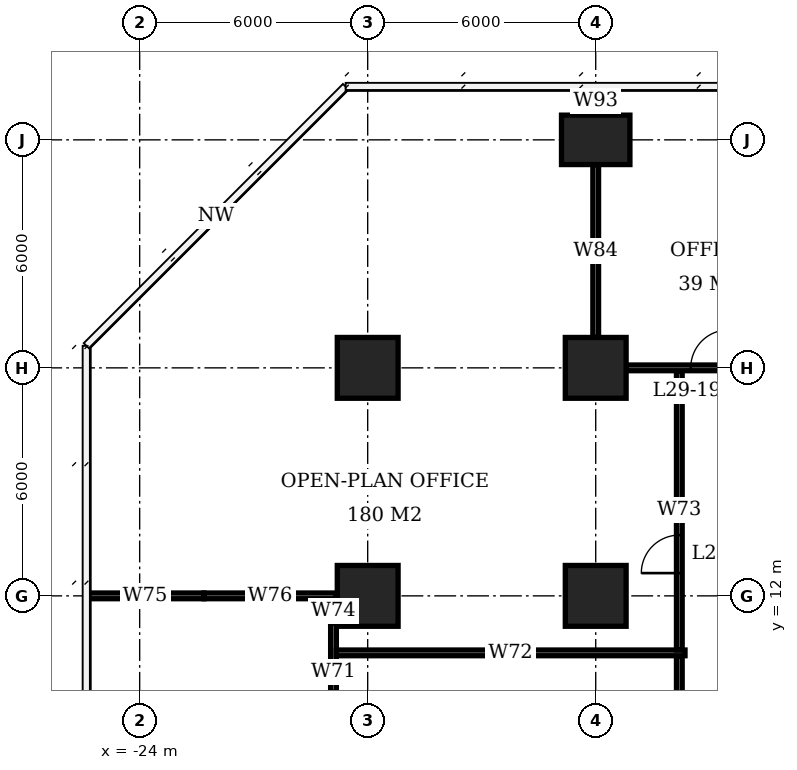
"""IFC4 building model, lengths in metres.
Left out: names, types, materials, properties, quantities, classifications, styles, units other than length and angle.
Written with IfcOpenShell. Run it as: python <this file> out.ifc"""

import sys

from ifc_helpers import new_model, si_unit, direction, frame, frame_2d, origin, origin_2d, place, context, subcontext, project, spatial, rectangle, extrude, element, fill, save


model = new_model("IFC4")
c1 = context("Model", 3, precision=1e-05, world=origin(), true_north=direction((0.0, 1.0)))
c2 = subcontext(c1, "Body", "Model", "MODEL_VIEW")
j1 = project(units=[si_unit("LENGTHUNIT", "METRE"), si_unit("PLANEANGLEUNIT", "RADIAN")], contexts=[c1])
p1 = place(None, origin())
s1 = spatial("IfcSite", under=j1, at=p1, CompositionType="ELEMENT")
p2 = place(p1, origin())
s2 = spatial("IfcBuilding", under=s1, at=p2, CompositionType="ELEMENT")
p3 = place(p2, frame((0.0, 0.0, 121.1)))
s3 = spatial("IfcBuildingStorey", under=s2, at=p3, CompositionType="ELEMENT", Elevation=121.1)
for number, where, z_axis, x_axis in (
    (1, (-18.0, 12.0, 0.0), (0.0, 0.0, 1.0), (1.0, 0.0, 0.0)),
    (2, (-18.0, 18.0, 0.0), (0.0, 0.0, 1.0), (1.0, 0.0, 0.0)),
    (3, (-12.0, 12.0, 0.0), (0.0, 0.0, 1.0), (1.0, 0.0, 0.0)),
    (4, (-12.0, 18.0, 0.0), (0.0, 0.0, 1.0), (1.0, 0.0, 0.0)),
):
    element("IfcColumn", number, at=place(p3, frame(where, z_axis=z_axis, x_axis=x_axis)), inside=s3, PredefinedType="COLUMN", context=c2, shape_type="SweptSolid", body=[
        extrude(rectangle(XDim=1.6, YDim=1.6, at=origin_2d()), origin(), (0.0, 0.0, 1.0), 3.9),
    ])
p4 = place(p3, frame((-12.0, 24.0, 0.0), z_axis=(0.0, 0.0, 1.0), x_axis=(1.0, 0.0, 0.0)))
e5 = element("IfcColumn", 5, at=p4, inside=s3, PredefinedType="COLUMN", context=c2, shape_type="SweptSolid", body=[
    extrude(rectangle(XDim=1.8, YDim=1.3, at=origin_2d()), origin(), (0.0, 0.0, 1.0), 3.9),
])
p5 = place(p3, frame((-25.4, 12.0, 0.0), z_axis=(0.0, 0.0, 1.0), x_axis=(1.0, 0.0, 0.0)))
e6 = element("IfcWall", 6, at=p5, inside=s3, PredefinedType="PARTITIONING", context=c2, shape_type="SweptSolid", body=[
    extrude(rectangle(XDim=3.09, YDim=0.15, at=frame_2d((1.545, 0.0))), origin(), (0.0, 0.0, 1.0), 3.65),
])
p6 = place(p3, frame((-22.31, 12.0, 0.0), z_axis=(0.0, 0.0, 1.0), x_axis=(1.0, 0.0, 0.0)))
e7 = element("IfcWall", 7, at=p6, inside=s3, PredefinedType="PARTITIONING", context=c2, shape_type="SweptSolid", body=[
    extrude(rectangle(XDim=3.485, YDim=0.15, at=frame_2d((1.743, 0.0))), origin(), (0.0, 0.0, 1.0), 2.65),
])
p7 = place(p3, frame((-11.2, 18.0, 0.0), z_axis=(0.0, 0.0, 1.0), x_axis=(1.0, 0.0, 0.0)))
e8 = element("IfcWall", 8, at=p7, inside=s3, PredefinedType="PARTITIONING", context=c2, shape_type="SweptSolid", body=[
    extrude(rectangle(XDim=4.4, YDim=0.15, at=frame_2d((2.2, 0.0))), origin(), (0.0, 0.0, 1.0), 3.65),
])
p8 = place(p7, frame((1.7, 0.0, 0.0)))
e9 = element("IfcOpeningElement", 9, at=p8, cuts=e8, PredefinedType="OPENING", context=c2, shape_type="SweptSolid", body=[
    extrude(rectangle(XDim=1.0, YDim=2.1, at=frame_2d((0.5, 1.05))), frame((0.0, 0.085, 0.0), z_axis=(0.0, -1.0, 0.0), x_axis=(1.0, 0.0, 0.0)), (0.0, 0.0, 1.0), 0.17),
])
p9 = place(p3, frame((-18.9, 6.71, 0.0), z_axis=(0.0, 0.0, 1.0), x_axis=(0.0, 1.0, 0.0)))
e10 = element("IfcWall", 10, at=p9, inside=s3, PredefinedType="PARTITIONING", context=c2, shape_type="SweptSolid", body=[
    extrude(rectangle(XDim=4.58, YDim=0.15, at=frame_2d((2.29, 0.0))), origin(), (0.0, 0.0, 1.0), 3.65),
])
p10 = place(p9, frame((1.79, 0.0, 0.0)))
e11 = element("IfcOpeningElement", 11, at=p10, cuts=e10, PredefinedType="OPENING", context=c2, shape_type="SweptSolid", body=[
    extrude(rectangle(XDim=1.0, YDim=2.1, at=frame_2d((0.5, 1.05))), frame((0.0, 0.085, 0.0), z_axis=(0.0, -1.0, 0.0), x_axis=(1.0, 0.0, 0.0)), (0.0, 0.0, 1.0), 0.17),
])
p11 = place(p3, frame((-18.9, 11.29, 0.0), z_axis=(0.0, 0.0, 1.0), x_axis=(0.0, 1.0, 0.0)))
e12 = element("IfcWall", 12, at=p11, inside=s3, PredefinedType="PARTITIONING", context=c2, shape_type="SweptSolid", body=[
    extrude(rectangle(XDim=0.635, YDim=0.15, at=frame_2d((0.317, 0.0))), origin(), (0.0, 0.0, 1.0), 2.65),
])
p12 = place(p3, frame((-12.0, 18.8, 0.0), z_axis=(0.0, 0.0, 1.0), x_axis=(0.0, 1.0, 0.0)))
e13 = element("IfcWall", 13, at=p12, inside=s3, PredefinedType="PARTITIONING", context=c2, shape_type="SweptSolid", body=[
    extrude(rectangle(XDim=4.55, YDim=0.15, at=frame_2d((2.275, 0.0))), origin(), (0.0, 0.0, 1.0), 3.65),
])
p13 = place(p3, frame((-12.0, 24.65, 0.0), z_axis=(0.0, 0.0, 1.0), x_axis=(0.0, 1.0, 0.0)))
e14 = element("IfcWall", 14, at=p13, inside=s3, PredefinedType="PARTITIONING", context=c2, shape_type="SweptSolid", body=[
    extrude(rectangle(XDim=0.75, YDim=0.15, at=frame_2d((0.375, 0.0))), origin(), (0.0, 0.0, 1.0), 3.65),
])
p14 = place(p3, frame((-18.825, 10.5, 0.0), z_axis=(0.0, 0.0, 1.0), x_axis=(1.0, 0.0, 0.0)))
e15 = element("IfcWall", 15, at=p14, inside=s3, PredefinedType="PARTITIONING", context=c2, shape_type="SweptSolid", body=[
    extrude(rectangle(XDim=9.175, YDim=0.15, at=frame_2d((4.587, 0.0))), origin(), (0.0, 0.0, 1.0), 3.65),
])
p15 = place(p3, frame((-9.8, -0.9, 0.0), z_axis=(0.0, 0.0, 1.0), x_axis=(0.0, 1.0, 0.0)))
e16 = element("IfcWall", 16, at=p15, inside=s3, PredefinedType="PARTITIONING", context=c2, shape_type="SweptSolid", body=[
    extrude(rectangle(XDim=11.325, YDim=0.15, at=frame_2d((5.663, 0.0))), origin(), (0.0, 0.0, 1.0), 3.65),
])
p16 = place(p15, frame((3.441, 0.0, 0.0)))
e17 = element("IfcOpeningElement", 17, at=p16, cuts=e16, PredefinedType="OPENING", context=c2, shape_type="SweptSolid", body=[
    extrude(rectangle(XDim=1.0, YDim=2.1, at=frame_2d((0.5, 1.05))), frame((0.0, 0.085, 0.0), z_axis=(0.0, -1.0, 0.0), x_axis=(1.0, 0.0, 0.0)), (0.0, 0.0, 1.0), 0.17),
])
p17 = place(p3, frame((-9.8, 10.575, 0.0), z_axis=(0.0, 0.0, 1.0), x_axis=(0.0, 1.0, 0.0)))
e18 = element("IfcWall", 18, at=p17, inside=s3, PredefinedType="PARTITIONING", context=c2, shape_type="SweptSolid", body=[
    extrude(rectangle(XDim=7.35, YDim=0.15, at=frame_2d((3.675, 0.0))), origin(), (0.0, 0.0, 1.0), 3.65),
])
p18 = place(p17, frame((2.024, 0.0, 0.0)))
e19 = element("IfcOpeningElement", 19, at=p18, cuts=e18, PredefinedType="OPENING", context=c2, shape_type="SweptSolid", body=[
    extrude(rectangle(XDim=1.0, YDim=2.1, at=frame_2d((0.5, 1.05))), frame((0.0, 0.085, 0.0), z_axis=(0.0, -1.0, 0.0), x_axis=(1.0, 0.0, 0.0)), (0.0, 0.0, 1.0), 0.17),
])
p19 = place(p8, origin())
e20 = element("IfcDoor", 20, at=p19, inside=s3, OperationType="SINGLE_SWING_RIGHT", PredefinedType="DOOR", context=c2, shape_type="SweptSolid", body=[
    extrude(rectangle(XDim=1.0, YDim=2.1, at=frame_2d((0.5, 1.05))), frame((0.0, 0.025, 0.0), z_axis=(0.0, -1.0, 0.0), x_axis=(1.0, 0.0, 0.0)), (0.0, 0.0, 1.0), 0.05),
])
fill(e9, e20)
p20 = place(p18, origin())
e21 = element("IfcDoor", 21, at=p20, inside=s3, OperationType="SINGLE_SWING_LEFT", PredefinedType="DOOR", context=c2, shape_type="SweptSolid", body=[
    extrude(rectangle(XDim=1.0, YDim=2.1, at=frame_2d((0.5, 1.05))), frame((0.0, 0.025, 0.0), z_axis=(0.0, -1.0, 0.0), x_axis=(1.0, 0.0, 0.0)), (0.0, 0.0, 1.0), 0.05),
])
fill(e19, e21)
save(model, sys.argv[1])
